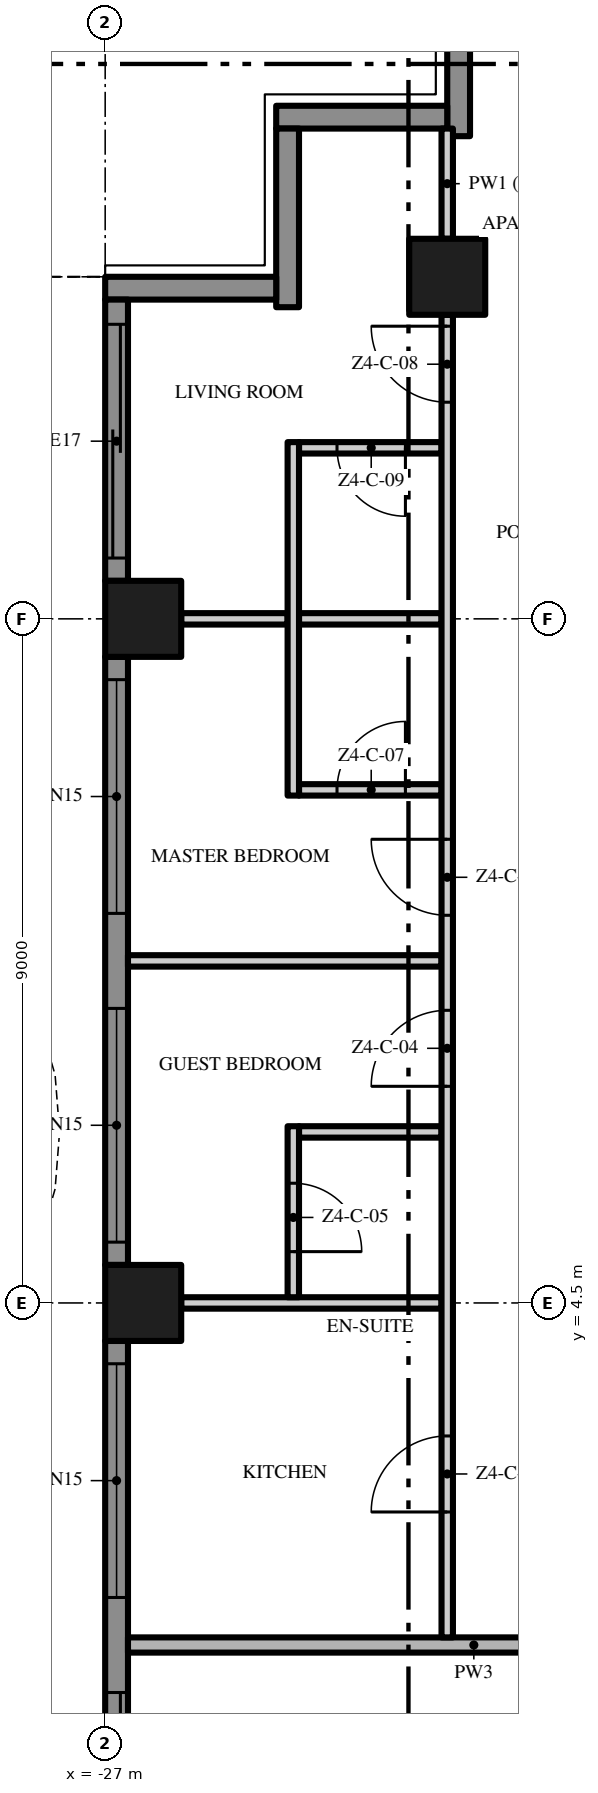
"""IFC4 building model, lengths in metres.
Left out: names, types, materials, properties, quantities, classifications, styles, units other than length and angle.
Written with IfcOpenShell. Run it as: python <this file> out.ifc"""

import sys

from ifc_helpers import new_model, si_unit, direction, frame, frame_2d, origin, origin_2d, place, context, subcontext, project, spatial, polyline, rectangle, outline, extrude, element, fill, save


model = new_model("IFC4")
c1 = context("Model", 3, precision=1e-05, world=origin(), true_north=direction((0.0, 1.0)))
c2 = subcontext(c1, "Body", "Model", "MODEL_VIEW")
j1 = project(units=[si_unit("LENGTHUNIT", "METRE"), si_unit("PLANEANGLEUNIT", "RADIAN")], contexts=[c1])
p1 = place(None, origin())
s1 = spatial("IfcSite", under=j1, at=p1, CompositionType="ELEMENT")
p2 = place(p1, origin())
s2 = spatial("IfcBuilding", under=s1, at=p2, CompositionType="ELEMENT")
p3 = place(p2, frame((0.0, 0.0, 211.0)))
s3 = spatial("IfcBuildingStorey", under=s2, at=p3, CompositionType="ELEMENT", Elevation=211.0)
for number, where, z_axis, x_axis in (
    (1, (-26.5, 13.5, 0.0), (0.0, 0.0, 1.0), (1.0, 0.0, 0.0)),
    (2, (-22.5, 18.0, 0.0), (0.0, 0.0, 1.0), (1.0, 0.0, 0.0)),
    (3, (-26.5, 4.5, 0.0), (0.0, 0.0, 1.0), (1.0, 0.0, 0.0)),
):
    element("IfcColumn", number, at=place(p3, frame(where, z_axis=z_axis, x_axis=x_axis)), inside=s3, PredefinedType="COLUMN", context=c2, shape_type="SweptSolid", body=[
        extrude(rectangle(XDim=1.0, YDim=1.0, at=origin_2d()), origin(), (0.0, 0.0, 1.0), 3.5),
    ])
p4 = place(p3, frame((-22.35, 19.85, 0.0), z_axis=(0.0, 0.0, 1.0), x_axis=(0.0, 1.0, 0.0)))
e4 = element("IfcWall", 4, at=p4, inside=s3, PredefinedType="SOLIDWALL", context=c2, shape_type="SweptSolid", body=[
    extrude(rectangle(XDim=2.35, YDim=0.3, at=frame_2d((1.175, 0.0))), origin(), (0.0, 0.0, 1.0), 3.5),
])
p5 = place(p3, frame((-24.75, 20.1, 0.0), z_axis=(0.0, 0.0, 1.0), x_axis=(1.0, 0.0, 0.0)))
e5 = element("IfcWall", 5, at=p5, inside=s3, PredefinedType="SOLIDWALL", context=c2, shape_type="SweptSolid", body=[
    extrude(rectangle(XDim=2.25, YDim=0.3, at=frame_2d((1.125, 0.0))), origin(), (0.0, 0.0, 1.0), 3.5),
])
p6 = place(p3, frame((-24.6, 17.6, 0.0), z_axis=(0.0, 0.0, 1.0), x_axis=(0.0, 1.0, 0.0)))
e6 = element("IfcWall", 6, at=p6, inside=s3, PredefinedType="SOLIDWALL", context=c2, shape_type="SweptSolid", body=[
    extrude(rectangle(XDim=2.35, YDim=0.3, at=frame_2d((1.175, 0.0))), origin(), (0.0, 0.0, 1.0), 3.5),
])
p7 = place(p3, frame((-27.0, 17.85, 0.0), z_axis=(0.0, 0.0, 1.0), x_axis=(1.0, 0.0, 0.0)))
e7 = element("IfcWall", 7, at=p7, inside=s3, PredefinedType="SOLIDWALL", context=c2, shape_type="SweptSolid", body=[
    extrude(rectangle(XDim=2.25, YDim=0.3, at=frame_2d((1.125, 0.0))), origin(), (0.0, 0.0, 1.0), 3.5),
])
p8 = place(p3, frame((-26.85, 14.0, 0.0), z_axis=(0.0, 0.0, 1.0), x_axis=(0.0, 1.0, 0.0)))
e8 = element("IfcWall", 8, at=p8, inside=s3, PredefinedType="SOLIDWALL", context=c2, shape_type="SweptSolid", body=[
    extrude(rectangle(XDim=3.7, YDim=0.3, at=frame_2d((1.85, 0.0))), origin(), (0.0, 0.0, 1.0), 3.5),
])
p9 = place(p8, frame((0.3, 0.0, 0.0)))
e9 = element("IfcOpeningElement", 9, at=p9, cuts=e8, PredefinedType="OPENING", context=c2, shape_type="SweptSolid", body=[
    extrude(rectangle(XDim=3.075, YDim=2.4, at=frame_2d((1.538, 1.2))), frame((0.0, 0.16, 0.0), z_axis=(0.0, -1.0, 0.0), x_axis=(1.0, 0.0, 0.0)), (0.0, 0.0, 1.0), 0.32),
])
p10 = place(p3, frame((-26.85, 5.0, 0.0), z_axis=(0.0, 0.0, 1.0), x_axis=(0.0, 1.0, 0.0)))
e10 = element("IfcWall", 10, at=p10, inside=s3, PredefinedType="SOLIDWALL", context=c2, shape_type="SweptSolid", body=[
    extrude(rectangle(XDim=8.0, YDim=0.3, at=frame_2d((4.0, 0.0))), origin(), (0.0, 0.0, 1.0), 3.5),
])
p11 = place(p10, frame((4.625, 0.0, 0.45)))
e11 = element("IfcOpeningElement", 11, at=p11, cuts=e10, PredefinedType="OPENING", context=c2, shape_type="SweptSolid", body=[
    extrude(rectangle(XDim=3.075, YDim=2.65, at=frame_2d((1.538, 1.325))), frame((0.0, 0.16, 0.0), z_axis=(0.0, -1.0, 0.0), x_axis=(1.0, 0.0, 0.0)), (0.0, 0.0, 1.0), 0.32),
])
p12 = place(p10, frame((0.3, 0.0, 0.45)))
e12 = element("IfcOpeningElement", 12, at=p12, cuts=e10, PredefinedType="OPENING", context=c2, shape_type="SweptSolid", body=[
    extrude(rectangle(XDim=3.075, YDim=2.65, at=frame_2d((1.538, 1.325))), frame((0.0, 0.16, 0.0), z_axis=(0.0, -1.0, 0.0), x_axis=(1.0, 0.0, 0.0)), (0.0, 0.0, 1.0), 0.32),
])
p13 = place(p3, frame((-26.85, -4.0, 0.0), z_axis=(0.0, 0.0, 1.0), x_axis=(0.0, 1.0, 0.0)))
e13 = element("IfcWall", 13, at=p13, inside=s3, PredefinedType="SOLIDWALL", context=c2, shape_type="SweptSolid", body=[
    extrude(rectangle(XDim=8.0, YDim=0.3, at=frame_2d((4.0, 0.0))), origin(), (0.0, 0.0, 1.0), 3.5),
])
p14 = place(p13, frame((4.625, 0.0, 0.45)))
e14 = element("IfcOpeningElement", 14, at=p14, cuts=e13, PredefinedType="OPENING", context=c2, shape_type="SweptSolid", body=[
    extrude(rectangle(XDim=3.075, YDim=2.65, at=frame_2d((1.538, 1.325))), frame((0.0, 0.16, 0.0), z_axis=(0.0, -1.0, 0.0), x_axis=(1.0, 0.0, 0.0)), (0.0, 0.0, 1.0), 0.32),
])
p15 = place(p13, frame((0.3, 0.0, 0.0)))
e15 = element("IfcOpeningElement", 15, at=p15, cuts=e13, PredefinedType="OPENING", context=c2, shape_type="SweptSolid", body=[
    extrude(rectangle(XDim=3.075, YDim=2.4, at=frame_2d((1.538, 1.2))), frame((0.0, 0.16, 0.0), z_axis=(0.0, -1.0, 0.0), x_axis=(1.0, 0.0, 0.0)), (0.0, 0.0, 1.0), 0.32),
])
p16 = place(p3, origin())
e16 = element("IfcWall", 16, at=p16, inside=s3, PredefinedType="USERDEFINED", context=c2, shape_type="SweptSolid", body=[
    extrude(outline(polyline([(-28.8, 18.0), (-29.505, 16.5), (-29.941, 15.0), (-30.0, 14.25), (-29.941, 13.5), (-29.505, 12.0), (-28.8, 10.5), (-28.095, 9.0), (-27.659, 7.5), (-27.6, 6.75), (-27.659, 6.0), (-28.095, 4.5), (-28.8, 3.0), (-29.505, 1.5), (-29.941, 0.0), (-30.0, -0.75), (-29.941, -1.5), (-29.505, -3.0), (-28.8, -4.5), (-28.095, -6.0), (-27.659, -7.5), (-27.6, -8.25), (-27.659, -9.0), (-28.095, -10.5), (-28.8, -12.0), (-29.505, -13.5), (-29.941, -15.0), (-30.0, -15.75), (-29.941, -16.5), (-29.505, -18.0), (-29.265, -17.93), (-29.694, -16.455), (-29.749, -15.75), (-29.694, -15.045), (-29.271, -13.589), (-28.574, -12.106), (-27.86, -10.589), (-27.411, -9.045), (-27.349, -8.25), (-27.411, -7.455), (-27.86, -5.911), (-28.574, -4.394), (-29.271, -2.911), (-29.694, -1.455), (-29.749, -0.75), (-29.694, -0.045), (-29.271, 1.411), (-28.574, 2.894), (-27.86, 4.411), (-27.411, 5.955), (-27.349, 6.75), (-27.411, 7.545), (-27.86, 9.089), (-28.574, 10.606), (-29.271, 12.089), (-29.694, 13.545), (-29.749, 14.25), (-29.694, 14.955), (-29.271, 16.411), (-28.574, 17.894), (-28.8, 18.0)])), origin(), (0.0, 0.0, 1.0), 0.9),
])
p17 = place(p3, frame((-26.7, 0.0, 0.0), z_axis=(0.0, 0.0, 1.0), x_axis=(1.0, 0.0, 0.0)))
e17 = element("IfcWall", 17, at=p17, inside=s3, PredefinedType="PARTITIONING", context=c2, shape_type="SweptSolid", body=[
    extrude(rectangle(XDim=9.1, YDim=0.2, at=frame_2d((4.55, 0.0))), origin(), (0.0, 0.0, 1.0), 3.5),
])
p18 = place(p3, frame((-26.0, 4.5, 0.0), z_axis=(0.0, 0.0, 1.0), x_axis=(1.0, 0.0, 0.0)))
e18 = element("IfcWall", 18, at=p18, inside=s3, PredefinedType="PARTITIONING", context=c2, shape_type="SweptSolid", body=[
    extrude(rectangle(XDim=3.425, YDim=0.15, at=frame_2d((1.712, 0.0))), origin(), (0.0, 0.0, 1.0), 3.5),
])
p19 = place(p3, frame((-24.45, 6.75, 0.0), z_axis=(0.0, 0.0, 1.0), x_axis=(1.0, 0.0, 0.0)))
e19 = element("IfcWall", 19, at=p19, inside=s3, PredefinedType="PARTITIONING", context=c2, shape_type="SweptSolid", body=[
    extrude(rectangle(XDim=1.875, YDim=0.15, at=frame_2d((0.938, 0.0))), origin(), (0.0, 0.0, 1.0), 3.5),
])
p20 = place(p3, frame((-26.7, 9.0, 0.0), z_axis=(0.0, 0.0, 1.0), x_axis=(1.0, 0.0, 0.0)))
e20 = element("IfcWall", 20, at=p20, inside=s3, PredefinedType="PARTITIONING", context=c2, shape_type="SweptSolid", body=[
    extrude(rectangle(XDim=4.125, YDim=0.15, at=frame_2d((2.062, 0.0))), origin(), (0.0, 0.0, 1.0), 3.5),
])
p21 = place(p3, frame((-24.45, 11.25, 0.0), z_axis=(0.0, 0.0, 1.0), x_axis=(1.0, 0.0, 0.0)))
e21 = element("IfcWall", 21, at=p21, inside=s3, PredefinedType="PARTITIONING", context=c2, shape_type="SweptSolid", body=[
    extrude(rectangle(XDim=1.875, YDim=0.15, at=frame_2d((0.938, 0.0))), origin(), (0.0, 0.0, 1.0), 3.5),
])
p22 = place(p21, frame((0.5, 0.0, 0.0)))
e22 = element("IfcOpeningElement", 22, at=p22, cuts=e21, PredefinedType="OPENING", context=c2, shape_type="SweptSolid", body=[
    extrude(rectangle(XDim=0.9, YDim=2.1, at=frame_2d((0.45, 1.05))), frame((0.0, 0.085, 0.0), z_axis=(0.0, -1.0, 0.0), x_axis=(1.0, 0.0, 0.0)), (0.0, 0.0, 1.0), 0.17),
])
p23 = place(p3, frame((-26.0, 13.5, 0.0), z_axis=(0.0, 0.0, 1.0), x_axis=(1.0, 0.0, 0.0)))
e23 = element("IfcWall", 23, at=p23, inside=s3, PredefinedType="PARTITIONING", context=c2, shape_type="SweptSolid", body=[
    extrude(rectangle(XDim=1.4, YDim=0.15, at=frame_2d((0.7, 0.0))), origin(), (0.0, 0.0, 1.0), 3.5),
])
p24 = place(p3, frame((-24.45, 13.5, 0.0), z_axis=(0.0, 0.0, 1.0), x_axis=(1.0, 0.0, 0.0)))
e24 = element("IfcWall", 24, at=p24, inside=s3, PredefinedType="PARTITIONING", context=c2, shape_type="SweptSolid", body=[
    extrude(rectangle(XDim=1.875, YDim=0.15, at=frame_2d((0.938, 0.0))), origin(), (0.0, 0.0, 1.0), 3.5),
])
p25 = place(p3, frame((-22.575, 15.75, 0.0), z_axis=(0.0, 0.0, 1.0), x_axis=(-1.0, 0.0, 0.0)))
e25 = element("IfcWall", 25, at=p25, inside=s3, PredefinedType="PARTITIONING", context=c2, shape_type="SweptSolid", body=[
    extrude(rectangle(XDim=1.875, YDim=0.15, at=frame_2d((0.938, 0.0))), origin(), (0.0, 0.0, 1.0), 3.5),
])
p26 = place(p25, frame((0.475, 0.0, 0.0)))
e26 = element("IfcOpeningElement", 26, at=p26, cuts=e25, PredefinedType="OPENING", context=c2, shape_type="SweptSolid", body=[
    extrude(rectangle(XDim=0.9, YDim=2.1, at=frame_2d((0.45, 1.05))), frame((0.0, 0.085, 0.0), z_axis=(0.0, -1.0, 0.0), x_axis=(1.0, 0.0, 0.0)), (0.0, 0.0, 1.0), 0.17),
])
p27 = place(p3, frame((-24.525, 6.825, 0.0), z_axis=(0.0, 0.0, 1.0), x_axis=(0.0, -1.0, 0.0)))
e27 = element("IfcWall", 27, at=p27, inside=s3, PredefinedType="PARTITIONING", context=c2, shape_type="SweptSolid", body=[
    extrude(rectangle(XDim=2.25, YDim=0.15, at=frame_2d((1.125, 0.0))), origin(), (0.0, 0.0, 1.0), 3.5),
])
p28 = place(p27, frame((0.75, 0.0, 0.0)))
e28 = element("IfcOpeningElement", 28, at=p28, cuts=e27, PredefinedType="OPENING", context=c2, shape_type="SweptSolid", body=[
    extrude(rectangle(XDim=0.9, YDim=2.1, at=frame_2d((0.45, 1.05))), frame((0.0, 0.085, 0.0), z_axis=(0.0, -1.0, 0.0), x_axis=(1.0, 0.0, 0.0)), (0.0, 0.0, 1.0), 0.17),
])
p29 = place(p3, frame((-24.525, 11.175, 0.0), z_axis=(0.0, 0.0, 1.0), x_axis=(0.0, 1.0, 0.0)))
e29 = element("IfcWall", 29, at=p29, inside=s3, PredefinedType="PARTITIONING", context=c2, shape_type="SweptSolid", body=[
    extrude(rectangle(XDim=4.65, YDim=0.15, at=frame_2d((2.325, 0.0))), origin(), (0.0, 0.0, 1.0), 3.5),
])
p30 = place(p3, frame((-22.5, 0.1, 0.0), z_axis=(0.0, 0.0, 1.0), x_axis=(0.0, 1.0, 0.0)))
e30 = element("IfcWall", 30, at=p30, inside=s3, PredefinedType="PARTITIONING", context=c2, shape_type="SweptSolid", body=[
    extrude(rectangle(XDim=17.4, YDim=0.15, at=frame_2d((8.7, 0.0))), origin(), (0.0, 0.0, 1.0), 3.5),
])
p31 = place(p30, frame((1.65, 0.0, 0.0)))
e31 = element("IfcOpeningElement", 31, at=p31, cuts=e30, PredefinedType="OPENING", context=c2, shape_type="SweptSolid", body=[
    extrude(rectangle(XDim=1.0, YDim=2.4, at=frame_2d((0.5, 1.2))), frame((0.0, 0.085, 0.0), z_axis=(0.0, -1.0, 0.0), x_axis=(1.0, 0.0, 0.0)), (0.0, 0.0, 1.0), 0.17),
])
p32 = place(p30, frame((7.25, 0.0, 0.0)))
e32 = element("IfcOpeningElement", 32, at=p32, cuts=e30, PredefinedType="OPENING", context=c2, shape_type="SweptSolid", body=[
    extrude(rectangle(XDim=1.0, YDim=2.4, at=frame_2d((0.5, 1.2))), frame((0.0, 0.085, 0.0), z_axis=(0.0, -1.0, 0.0), x_axis=(1.0, 0.0, 0.0)), (0.0, 0.0, 1.0), 0.17),
])
p33 = place(p30, frame((9.5, 0.0, 0.0)))
e33 = element("IfcOpeningElement", 33, at=p33, cuts=e30, PredefinedType="OPENING", context=c2, shape_type="SweptSolid", body=[
    extrude(rectangle(XDim=1.0, YDim=2.4, at=frame_2d((0.5, 1.2))), frame((0.0, 0.085, 0.0), z_axis=(0.0, -1.0, 0.0), x_axis=(1.0, 0.0, 0.0)), (0.0, 0.0, 1.0), 0.17),
])
p34 = place(p30, frame((16.25, 0.0, 0.0)))
e34 = element("IfcOpeningElement", 34, at=p34, cuts=e30, PredefinedType="OPENING", context=c2, shape_type="SweptSolid", body=[
    extrude(rectangle(XDim=1.0, YDim=2.4, at=frame_2d((0.5, 1.2))), frame((0.0, 0.085, 0.0), z_axis=(0.0, -1.0, 0.0), x_axis=(1.0, 0.0, 0.0)), (0.0, 0.0, 1.0), 0.17),
])
p35 = place(p3, frame((-22.5, 18.5, 0.0), z_axis=(0.0, 0.0, 1.0), x_axis=(0.0, 1.0, 0.0)))
e35 = element("IfcWall", 35, at=p35, inside=s3, PredefinedType="PARTITIONING", context=c2, shape_type="SweptSolid", body=[
    extrude(rectangle(XDim=1.45, YDim=0.15, at=frame_2d((0.725, 0.0))), origin(), (0.0, 0.0, 1.0), 3.5),
])
p36 = place(p9, origin())
e36 = element("IfcDoor", 36, at=p36, inside=s3, OperationType="SINGLE_SWING_LEFT", PredefinedType="DOOR", context=c2, shape_type="SweptSolid", body=[
    extrude(rectangle(XDim=3.075, YDim=2.4, at=frame_2d((1.538, 1.2))), frame((0.0, 0.025, 0.0), z_axis=(0.0, -1.0, 0.0), x_axis=(1.0, 0.0, 0.0)), (0.0, 0.0, 1.0), 0.05),
])
fill(e9, e36)
p37 = place(p11, origin())
e37 = element("IfcWindow", 37, at=p37, inside=s3, PartitioningType="SINGLE_PANEL", PredefinedType="WINDOW", context=c2, shape_type="SweptSolid", body=[
    extrude(rectangle(XDim=3.075, YDim=2.65, at=frame_2d((1.538, 1.325))), frame((0.0, 0.03, 0.0), z_axis=(0.0, -1.0, 0.0), x_axis=(1.0, 0.0, 0.0)), (0.0, 0.0, 1.0), 0.06),
])
fill(e11, e37)
p38 = place(p12, origin())
e38 = element("IfcWindow", 38, at=p38, inside=s3, PartitioningType="SINGLE_PANEL", PredefinedType="WINDOW", context=c2, shape_type="SweptSolid", body=[
    extrude(rectangle(XDim=3.075, YDim=2.65, at=frame_2d((1.538, 1.325))), frame((0.0, 0.03, 0.0), z_axis=(0.0, -1.0, 0.0), x_axis=(1.0, 0.0, 0.0)), (0.0, 0.0, 1.0), 0.06),
])
fill(e12, e38)
p39 = place(p14, origin())
e39 = element("IfcWindow", 39, at=p39, inside=s3, PartitioningType="SINGLE_PANEL", PredefinedType="WINDOW", context=c2, shape_type="SweptSolid", body=[
    extrude(rectangle(XDim=3.075, YDim=2.65, at=frame_2d((1.538, 1.325))), frame((0.0, 0.03, 0.0), z_axis=(0.0, -1.0, 0.0), x_axis=(1.0, 0.0, 0.0)), (0.0, 0.0, 1.0), 0.06),
])
fill(e14, e39)
p40 = place(p15, origin())
e40 = element("IfcDoor", 40, at=p40, inside=s3, OperationType="SINGLE_SWING_LEFT", PredefinedType="DOOR", context=c2, shape_type="SweptSolid", body=[
    extrude(rectangle(XDim=3.075, YDim=2.4, at=frame_2d((1.538, 1.2))), frame((0.0, 0.025, 0.0), z_axis=(0.0, -1.0, 0.0), x_axis=(1.0, 0.0, 0.0)), (0.0, 0.0, 1.0), 0.05),
])
fill(e15, e40)
p41 = place(p31, origin())
e41 = element("IfcDoor", 41, at=p41, inside=s3, OperationType="SINGLE_SWING_LEFT", PredefinedType="DOOR", context=c2, shape_type="SweptSolid", body=[
    extrude(rectangle(XDim=1.0, YDim=2.4, at=frame_2d((0.5, 1.2))), frame((0.0, 0.025, 0.0), z_axis=(0.0, -1.0, 0.0), x_axis=(1.0, 0.0, 0.0)), (0.0, 0.0, 1.0), 0.05),
])
fill(e31, e41)
p42 = place(p32, origin())
e42 = element("IfcDoor", 42, at=p42, inside=s3, OperationType="SINGLE_SWING_LEFT", PredefinedType="DOOR", context=c2, shape_type="SweptSolid", body=[
    extrude(rectangle(XDim=1.0, YDim=2.4, at=frame_2d((0.5, 1.2))), frame((0.0, 0.025, 0.0), z_axis=(0.0, -1.0, 0.0), x_axis=(1.0, 0.0, 0.0)), (0.0, 0.0, 1.0), 0.05),
])
fill(e32, e42)
p43 = place(p28, origin())
e43 = element("IfcDoor", 43, at=p43, inside=s3, OperationType="SINGLE_SWING_RIGHT", PredefinedType="DOOR", context=c2, shape_type="SweptSolid", body=[
    extrude(rectangle(XDim=0.9, YDim=2.1, at=frame_2d((0.45, 1.05))), frame((0.0, 0.025, 0.0), z_axis=(0.0, -1.0, 0.0), x_axis=(1.0, 0.0, 0.0)), (0.0, 0.0, 1.0), 0.05),
])
fill(e28, e43)
p44 = place(p33, origin())
e44 = element("IfcDoor", 44, at=p44, inside=s3, OperationType="SINGLE_SWING_RIGHT", PredefinedType="DOOR", context=c2, shape_type="SweptSolid", body=[
    extrude(rectangle(XDim=1.0, YDim=2.4, at=frame_2d((0.5, 1.2))), frame((0.0, 0.025, 0.0), z_axis=(0.0, -1.0, 0.0), x_axis=(1.0, 0.0, 0.0)), (0.0, 0.0, 1.0), 0.05),
])
fill(e33, e44)
p45 = place(p22, origin())
e45 = element("IfcDoor", 45, at=p45, inside=s3, OperationType="SINGLE_SWING_RIGHT", PredefinedType="DOOR", context=c2, shape_type="SweptSolid", body=[
    extrude(rectangle(XDim=0.9, YDim=2.1, at=frame_2d((0.45, 1.05))), frame((0.0, 0.025, 0.0), z_axis=(0.0, -1.0, 0.0), x_axis=(1.0, 0.0, 0.0)), (0.0, 0.0, 1.0), 0.05),
])
fill(e22, e45)
p46 = place(p34, origin())
e46 = element("IfcDoor", 46, at=p46, inside=s3, OperationType="SINGLE_SWING_RIGHT", PredefinedType="DOOR", context=c2, shape_type="SweptSolid", body=[
    extrude(rectangle(XDim=1.0, YDim=2.4, at=frame_2d((0.5, 1.2))), frame((0.0, 0.025, 0.0), z_axis=(0.0, -1.0, 0.0), x_axis=(1.0, 0.0, 0.0)), (0.0, 0.0, 1.0), 0.05),
])
fill(e34, e46)
p47 = place(p26, origin())
e47 = element("IfcDoor", 47, at=p47, inside=s3, OperationType="SINGLE_SWING_LEFT", PredefinedType="DOOR", context=c2, shape_type="SweptSolid", body=[
    extrude(rectangle(XDim=0.9, YDim=2.1, at=frame_2d((0.45, 1.05))), frame((0.0, 0.025, 0.0), z_axis=(0.0, -1.0, 0.0), x_axis=(1.0, 0.0, 0.0)), (0.0, 0.0, 1.0), 0.05),
])
fill(e26, e47)
save(model, sys.argv[1])
